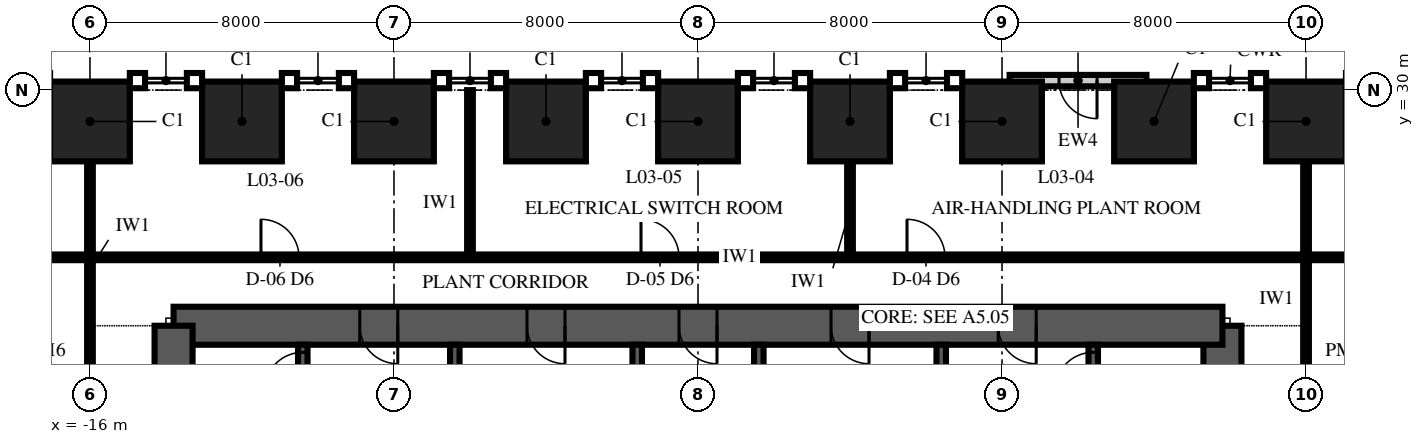
"""IFC4 building model, lengths in metres.
Left out: names, types, materials, properties, quantities, classifications, styles, units other than length and angle.
Written with IfcOpenShell. Run it as: python <this file> out.ifc"""

import sys

from ifc_helpers import new_model, si_unit, direction, frame, frame_2d, origin, origin_2d, place, context, subcontext, project, spatial, polyline, rectangle, outline, extrude, element, fill, save


model = new_model("IFC4")
c1 = context("Model", 3, precision=1e-05, world=origin(), true_north=direction((0.0, 1.0)))
c2 = subcontext(c1, "Body", "Model", "MODEL_VIEW")
j1 = project(units=[si_unit("LENGTHUNIT", "METRE"), si_unit("PLANEANGLEUNIT", "RADIAN")], contexts=[c1])
p1 = place(None, origin())
s1 = spatial("IfcSite", under=j1, at=p1, CompositionType="ELEMENT")
p2 = place(p1, origin())
s2 = spatial("IfcBuilding", under=s1, at=p2, CompositionType="ELEMENT")
p3 = place(p2, frame((0.0, 0.0, 19.0)))
s3 = spatial("IfcBuildingStorey", under=s2, at=p3, CompositionType="ELEMENT", Elevation=19.0)
for number, where, z_axis, x_axis in (
    (1, (16.0, 29.175, 0.0), (0.0, 0.0, 1.0), (-1.0, 0.0, 0.0)),
    (2, (12.0, 29.175, 0.0), (0.0, 0.0, 1.0), (-1.0, 0.0, 0.0)),
    (3, (8.0, 29.175, 0.0), (0.0, 0.0, 1.0), (-1.0, 0.0, 0.0)),
    (4, (4.0, 29.175, 0.0), (0.0, 0.0, 1.0), (-1.0, 0.0, 0.0)),
    (5, (0.0, 29.175, 0.0), (0.0, 0.0, 1.0), (-1.0, 0.0, 0.0)),
    (6, (-4.0, 29.175, 0.0), (0.0, 0.0, 1.0), (-1.0, 0.0, 0.0)),
    (7, (-8.0, 29.175, 0.0), (0.0, 0.0, 1.0), (-1.0, 0.0, 0.0)),
    (8, (-12.0, 29.175, 0.0), (0.0, 0.0, 1.0), (-1.0, 0.0, 0.0)),
    (9, (-16.0, 29.175, 0.0), (0.0, 0.0, 1.0), (-1.0, 0.0, 0.0)),
):
    element("IfcColumn", number, at=place(p3, frame(where, z_axis=z_axis, x_axis=x_axis)), inside=s3, PredefinedType="COLUMN", context=c2, shape_type="SweptSolid", body=[
        extrude(rectangle(XDim=2.1, YDim=2.1, at=origin_2d()), origin(), (0.0, 0.0, 1.0), 9.0),
    ])
p4 = place(p3, frame((13.8, 6.2, 0.0), z_axis=(0.0, 0.0, 1.0), x_axis=(0.0, 1.0, 0.0)))
e10 = element("IfcWall", 10, at=p4, inside=s3, PredefinedType="SHEAR", context=c2, shape_type="SweptSolid", body=[
    extrude(outline(polyline([(0.0, -0.5), (17.6, -0.5), (17.6, 0.0), (17.1, 0.0), (17.1, 0.5), (0.5, 0.5), (0.5, 0.0), (0.0, 0.0), (0.0, -0.5)])), origin(), (0.0, 0.0, 1.0), 9.0),
])
p5 = place(p4, frame((4.1, 0.0, 0.0)))
e11 = element("IfcOpeningElement", 11, at=p5, cuts=e10, PredefinedType="OPENING", context=c2, shape_type="SweptSolid", body=[
    extrude(rectangle(XDim=1.8, YDim=2.4, at=frame_2d((0.9, 1.2))), frame((0.0, 0.515, 0.0), z_axis=(0.0, -1.0, 0.0), x_axis=(1.0, 0.0, 0.0)), (0.0, 0.0, 1.0), 1.03),
])
p6 = place(p3, frame((13.8, 23.8, 0.0), z_axis=(0.0, 0.0, 1.0), x_axis=(-1.0, 0.0, 0.0)))
e12 = element("IfcWall", 12, at=p6, inside=s3, PredefinedType="SHEAR", context=c2, shape_type="SweptSolid", body=[
    extrude(rectangle(XDim=27.6, YDim=1.0, at=frame_2d((13.8, 0.0))), origin(), (0.0, 0.0, 1.0), 9.0),
])
p7 = place(p6, frame((21.7, 0.0, 0.0)))
e13 = element("IfcOpeningElement", 13, at=p7, cuts=e12, PredefinedType="OPENING", context=c2, shape_type="SweptSolid", body=[
    extrude(rectangle(XDim=1.0, YDim=2.1, at=frame_2d((0.5, 1.05))), frame((0.0, 0.515, 0.0), z_axis=(0.0, -1.0, 0.0), x_axis=(1.0, 0.0, 0.0)), (0.0, 0.0, 1.0), 1.03),
])
p8 = place(p6, frame((4.9, 0.0, 0.0)))
e14 = element("IfcOpeningElement", 14, at=p8, cuts=e12, PredefinedType="OPENING", context=c2, shape_type="SweptSolid", body=[
    extrude(rectangle(XDim=1.0, YDim=2.1, at=frame_2d((0.5, 1.05))), frame((0.0, 0.515, 0.0), z_axis=(0.0, -1.0, 0.0), x_axis=(1.0, 0.0, 0.0)), (0.0, 0.0, 1.0), 1.03),
])
p9 = place(p6, frame((17.3, 0.0, 0.0)))
e15 = element("IfcOpeningElement", 15, at=p9, cuts=e12, PredefinedType="OPENING", context=c2, shape_type="SweptSolid", body=[
    extrude(rectangle(XDim=1.0, YDim=2.1, at=frame_2d((0.5, 1.05))), frame((0.0, 0.515, 0.0), z_axis=(0.0, -1.0, 0.0), x_axis=(1.0, 0.0, 0.0)), (0.0, 0.0, 1.0), 1.03),
])
p10 = place(p6, frame((13.3, 0.0, 0.0)))
e16 = element("IfcOpeningElement", 16, at=p10, cuts=e12, PredefinedType="OPENING", context=c2, shape_type="SweptSolid", body=[
    extrude(rectangle(XDim=1.0, YDim=2.1, at=frame_2d((0.5, 1.05))), frame((0.0, 0.515, 0.0), z_axis=(0.0, -1.0, 0.0), x_axis=(1.0, 0.0, 0.0)), (0.0, 0.0, 1.0), 1.03),
])
p11 = place(p6, frame((9.3, 0.0, 0.0)))
e17 = element("IfcOpeningElement", 17, at=p11, cuts=e12, PredefinedType="OPENING", context=c2, shape_type="SweptSolid", body=[
    extrude(rectangle(XDim=1.0, YDim=2.1, at=frame_2d((0.5, 1.05))), frame((0.0, 0.515, 0.0), z_axis=(0.0, -1.0, 0.0), x_axis=(1.0, 0.0, 0.0)), (0.0, 0.0, 1.0), 1.03),
])
p12 = place(p3, frame((-13.8, 23.8, 0.0), z_axis=(0.0, 0.0, 1.0), x_axis=(0.0, -1.0, 0.0)))
e18 = element("IfcWall", 18, at=p12, inside=s3, PredefinedType="SHEAR", context=c2, shape_type="SweptSolid", body=[
    extrude(outline(polyline([(0.0, -0.5), (17.6, -0.5), (17.6, 0.0), (17.1, 0.0), (17.1, 0.5), (0.5, 0.5), (0.5, 0.0), (0.0, 0.0), (0.0, -0.5)])), origin(), (0.0, 0.0, 1.0), 9.0),
])
p13 = place(p12, frame((11.7, 0.0, 0.0)))
e19 = element("IfcOpeningElement", 19, at=p13, cuts=e18, PredefinedType="OPENING", context=c2, shape_type="SweptSolid", body=[
    extrude(rectangle(XDim=1.8, YDim=2.4, at=frame_2d((0.9, 1.2))), frame((0.0, 0.515, 0.0), z_axis=(0.0, -1.0, 0.0), x_axis=(1.0, 0.0, 0.0)), (0.0, 0.0, 1.0), 1.03),
])
p14 = place(p3, frame((-10.4, 16.125, 0.0), z_axis=(0.0, 0.0, 1.0), x_axis=(0.0, 1.0, 0.0)))
e20 = element("IfcWall", 20, at=p14, inside=s3, PredefinedType="SHEAR", context=c2, shape_type="SweptSolid", body=[
    extrude(rectangle(XDim=7.175, YDim=0.25, at=frame_2d((3.587, 0.0))), origin(), (0.0, 0.0, 1.0), 9.0),
])
p15 = place(p14, frame((5.975, 0.0, 0.0)))
e21 = element("IfcOpeningElement", 21, at=p15, cuts=e20, PredefinedType="OPENING", context=c2, shape_type="SweptSolid", body=[
    extrude(rectangle(XDim=1.0, YDim=2.1, at=frame_2d((0.5, 1.05))), frame((0.0, 0.14, 0.0), z_axis=(0.0, -1.0, 0.0), x_axis=(1.0, 0.0, 0.0)), (0.0, 0.0, 1.0), 0.28),
])
for number, where, z_axis, x_axis in (
    (22, (-6.4, 16.125, 0.0), (0.0, 0.0, 1.0), (0.0, 1.0, 0.0)),
    (23, (-1.6, 16.125, 0.0), (0.0, 0.0, 1.0), (0.0, 1.0, 0.0)),
    (24, (1.6, 16.125, 0.0), (0.0, 0.0, 1.0), (0.0, 1.0, 0.0)),
    (25, (6.4, 16.125, 0.0), (0.0, 0.0, 1.0), (0.0, 1.0, 0.0)),
):
    element("IfcWall", number, at=place(p3, frame(where, z_axis=z_axis, x_axis=x_axis)), inside=s3, PredefinedType="SHEAR", context=c2, shape_type="SweptSolid", body=[
        extrude(rectangle(XDim=7.175, YDim=0.25, at=frame_2d((3.587, 0.0))), origin(), (0.0, 0.0, 1.0), 9.0),
    ])
p16 = place(p3, frame((10.4, 16.125, 0.0), z_axis=(0.0, 0.0, 1.0), x_axis=(0.0, 1.0, 0.0)))
e26 = element("IfcWall", 26, at=p16, inside=s3, PredefinedType="SHEAR", context=c2, shape_type="SweptSolid", body=[
    extrude(rectangle(XDim=7.175, YDim=0.25, at=frame_2d((3.587, 0.0))), origin(), (0.0, 0.0, 1.0), 9.0),
])
p17 = place(p16, frame((5.975, 0.0, 0.0)))
e27 = element("IfcOpeningElement", 27, at=p17, cuts=e26, PredefinedType="OPENING", context=c2, shape_type="SweptSolid", body=[
    extrude(rectangle(XDim=1.0, YDim=2.1, at=frame_2d((0.5, 1.05))), frame((0.0, 0.14, 0.0), z_axis=(0.0, -1.0, 0.0), x_axis=(1.0, 0.0, 0.0)), (0.0, 0.0, 1.0), 0.28),
])
p18 = place(p3, frame((11.8, 30.25, 0.0), z_axis=(0.0, 0.0, 1.0), x_axis=(-1.0, 0.0, 0.0)))
e28 = element("IfcWall", 28, at=p18, inside=s3, PredefinedType="SOLIDWALL", context=c2, shape_type="SweptSolid", body=[
    extrude(rectangle(XDim=3.6, YDim=0.3, at=frame_2d((1.8, 0.0))), origin(), (0.0, 0.0, 1.0), 9.0),
])
p19 = place(p18, frame((1.3, 0.0, 0.0)))
e29 = element("IfcOpeningElement", 29, at=p19, cuts=e28, PredefinedType="OPENING", context=c2, shape_type="SweptSolid", body=[
    extrude(rectangle(XDim=1.0, YDim=2.2, at=frame_2d((0.5, 1.1))), frame((0.0, 0.165, 0.0), z_axis=(0.0, -1.0, 0.0), x_axis=(1.0, 0.0, 0.0)), (0.0, 0.0, 1.0), 0.33),
])
p20 = place(p3, frame((-16.0, 22.46, 0.0), z_axis=(0.0, 0.0, 1.0), x_axis=(0.0, 1.0, 0.0)))
e30 = element("IfcWall", 30, at=p20, inside=s3, PredefinedType="PARTITIONING", context=c2, shape_type="SweptSolid", body=[
    extrude(rectangle(XDim=5.655, YDim=0.15, at=frame_2d((2.828, 0.0))), origin(), (0.0, 0.0, 1.0), 8.317),
])
p21 = place(p3, frame((-6.0, 25.6, 0.0), z_axis=(0.0, 0.0, 1.0), x_axis=(0.0, 1.0, 0.0)))
e31 = element("IfcWall", 31, at=p21, inside=s3, PredefinedType="PARTITIONING", context=c2, shape_type="SweptSolid", body=[
    extrude(rectangle(XDim=4.4, YDim=0.15, at=frame_2d((2.2, 0.0))), origin(), (0.0, 0.0, 1.0), 8.75),
])
p22 = place(p3, frame((4.0, 25.6, 0.0), z_axis=(0.0, 0.0, 1.0), x_axis=(0.0, 1.0, 0.0)))
e32 = element("IfcWall", 32, at=p22, inside=s3, PredefinedType="PARTITIONING", context=c2, shape_type="SweptSolid", body=[
    extrude(rectangle(XDim=2.515, YDim=0.15, at=frame_2d((1.257, 0.0))), origin(), (0.0, 0.0, 1.0), 8.75),
])
p23 = place(p3, frame((16.0, 22.46, 0.0), z_axis=(0.0, 0.0, 1.0), x_axis=(0.0, 1.0, 0.0)))
e33 = element("IfcWall", 33, at=p23, inside=s3, PredefinedType="PARTITIONING", context=c2, shape_type="SweptSolid", body=[
    extrude(rectangle(XDim=5.655, YDim=0.15, at=frame_2d((2.828, 0.0))), origin(), (0.0, 0.0, 1.0), 8.317),
])
p24 = place(p3, frame((-22.493, 25.6, 0.0), z_axis=(0.0, 0.0, 1.0), x_axis=(1.0, 0.0, 0.0)))
e34 = element("IfcWall", 34, at=p24, inside=s3, PredefinedType="PARTITIONING", context=c2, shape_type="SweptSolid", body=[
    extrude(rectangle(XDim=44.986, YDim=0.15, at=frame_2d((22.493, 0.0))), origin(), (0.0, 0.0, 1.0), 8.75),
])
p25 = place(p24, frame((10.993, 0.0, 0.0)))
e35 = element("IfcOpeningElement", 35, at=p25, cuts=e34, PredefinedType="OPENING", context=c2, shape_type="SweptSolid", body=[
    extrude(rectangle(XDim=1.0, YDim=2.1, at=frame_2d((0.5, 1.05))), frame((0.0, 0.09, 0.0), z_axis=(0.0, -1.0, 0.0), x_axis=(1.0, 0.0, 0.0)), (0.0, 0.0, 1.0), 0.18),
])
p26 = place(p24, frame((20.993, 0.0, 0.0)))
e36 = element("IfcOpeningElement", 36, at=p26, cuts=e34, PredefinedType="OPENING", context=c2, shape_type="SweptSolid", body=[
    extrude(rectangle(XDim=1.0, YDim=2.1, at=frame_2d((0.5, 1.05))), frame((0.0, 0.09, 0.0), z_axis=(0.0, -1.0, 0.0), x_axis=(1.0, 0.0, 0.0)), (0.0, 0.0, 1.0), 0.18),
])
p27 = place(p24, frame((27.993, 0.0, 0.0)))
e37 = element("IfcOpeningElement", 37, at=p27, cuts=e34, PredefinedType="OPENING", context=c2, shape_type="SweptSolid", body=[
    extrude(rectangle(XDim=1.0, YDim=2.1, at=frame_2d((0.5, 1.05))), frame((0.0, 0.09, 0.0), z_axis=(0.0, -1.0, 0.0), x_axis=(1.0, 0.0, 0.0)), (0.0, 0.0, 1.0), 0.18),
])
p28 = place(p19, origin())
e38 = element("IfcDoor", 38, at=p28, inside=s3, OperationType="SINGLE_SWING_RIGHT", PredefinedType="DOOR", context=c2, shape_type="SweptSolid", body=[
    extrude(rectangle(XDim=1.0, YDim=2.2, at=frame_2d((0.5, 1.1))), frame((0.0, 0.15, 0.0), z_axis=(0.0, -1.0, 0.0), x_axis=(1.0, 0.0, 0.0)), (0.0, 0.0, 1.0), 0.3),
])
fill(e29, e38)
p29 = place(p7, origin())
e39 = element("IfcDoor", 39, at=p29, inside=s3, OperationType="SINGLE_SWING_RIGHT", PredefinedType="DOOR", context=c2, shape_type="SweptSolid", body=[
    extrude(rectangle(XDim=1.0, YDim=2.1, at=frame_2d((0.5, 1.05))), frame((0.0, 0.5, 0.0), z_axis=(0.0, -1.0, 0.0), x_axis=(1.0, 0.0, 0.0)), (0.0, 0.0, 1.0), 1.0),
])
fill(e13, e39)
p30 = place(p8, origin())
e40 = element("IfcDoor", 40, at=p30, inside=s3, OperationType="SINGLE_SWING_RIGHT", PredefinedType="DOOR", context=c2, shape_type="SweptSolid", body=[
    extrude(rectangle(XDim=1.0, YDim=2.1, at=frame_2d((0.5, 1.05))), frame((0.0, 0.5, 0.0), z_axis=(0.0, -1.0, 0.0), x_axis=(1.0, 0.0, 0.0)), (0.0, 0.0, 1.0), 1.0),
])
fill(e14, e40)
p31 = place(p9, origin())
e41 = element("IfcDoor", 41, at=p31, inside=s3, OperationType="SINGLE_SWING_LEFT", PredefinedType="DOOR", context=c2, shape_type="SweptSolid", body=[
    extrude(rectangle(XDim=1.0, YDim=2.1, at=frame_2d((0.5, 1.05))), frame((0.0, 0.5, 0.0), z_axis=(0.0, -1.0, 0.0), x_axis=(1.0, 0.0, 0.0)), (0.0, 0.0, 1.0), 1.0),
])
fill(e15, e41)
p32 = place(p10, origin())
e42 = element("IfcDoor", 42, at=p32, inside=s3, OperationType="SINGLE_SWING_LEFT", PredefinedType="DOOR", context=c2, shape_type="SweptSolid", body=[
    extrude(rectangle(XDim=1.0, YDim=2.1, at=frame_2d((0.5, 1.05))), frame((0.0, 0.5, 0.0), z_axis=(0.0, -1.0, 0.0), x_axis=(1.0, 0.0, 0.0)), (0.0, 0.0, 1.0), 1.0),
])
fill(e16, e42)
p33 = place(p11, origin())
e43 = element("IfcDoor", 43, at=p33, inside=s3, OperationType="SINGLE_SWING_LEFT", PredefinedType="DOOR", context=c2, shape_type="SweptSolid", body=[
    extrude(rectangle(XDim=1.0, YDim=2.1, at=frame_2d((0.5, 1.05))), frame((0.0, 0.5, 0.0), z_axis=(0.0, -1.0, 0.0), x_axis=(1.0, 0.0, 0.0)), (0.0, 0.0, 1.0), 1.0),
])
fill(e17, e43)
p34 = place(p15, origin())
e44 = element("IfcDoor", 44, at=p34, inside=s3, OperationType="SINGLE_SWING_LEFT", PredefinedType="DOOR", context=c2, shape_type="SweptSolid", body=[
    extrude(rectangle(XDim=1.0, YDim=2.1, at=frame_2d((0.5, 1.05))), frame((0.0, 0.125, 0.0), z_axis=(0.0, -1.0, 0.0), x_axis=(1.0, 0.0, 0.0)), (0.0, 0.0, 1.0), 0.25),
])
fill(e21, e44)
p35 = place(p17, origin())
e45 = element("IfcDoor", 45, at=p35, inside=s3, OperationType="SINGLE_SWING_LEFT", PredefinedType="DOOR", context=c2, shape_type="SweptSolid", body=[
    extrude(rectangle(XDim=1.0, YDim=2.1, at=frame_2d((0.5, 1.05))), frame((0.0, 0.125, 0.0), z_axis=(0.0, -1.0, 0.0), x_axis=(1.0, 0.0, 0.0)), (0.0, 0.0, 1.0), 0.25),
])
fill(e27, e45)
p36 = place(p25, origin())
e46 = element("IfcDoor", 46, at=p36, inside=s3, OperationType="SINGLE_SWING_LEFT", PredefinedType="DOOR", context=c2, shape_type="SweptSolid", body=[
    extrude(rectangle(XDim=1.0, YDim=2.1, at=frame_2d((0.5, 1.05))), frame((0.0, 0.075, 0.0), z_axis=(0.0, -1.0, 0.0), x_axis=(1.0, 0.0, 0.0)), (0.0, 0.0, 1.0), 0.149),
])
fill(e35, e46)
p37 = place(p26, origin())
e47 = element("IfcDoor", 47, at=p37, inside=s3, OperationType="SINGLE_SWING_LEFT", PredefinedType="DOOR", context=c2, shape_type="SweptSolid", body=[
    extrude(rectangle(XDim=1.0, YDim=2.1, at=frame_2d((0.5, 1.05))), frame((0.0, 0.075, 0.0), z_axis=(0.0, -1.0, 0.0), x_axis=(1.0, 0.0, 0.0)), (0.0, 0.0, 1.0), 0.149),
])
fill(e36, e47)
p38 = place(p27, origin())
e48 = element("IfcDoor", 48, at=p38, inside=s3, OperationType="SINGLE_SWING_LEFT", PredefinedType="DOOR", context=c2, shape_type="SweptSolid", body=[
    extrude(rectangle(XDim=1.0, YDim=2.1, at=frame_2d((0.5, 1.05))), frame((0.0, 0.075, 0.0), z_axis=(0.0, -1.0, 0.0), x_axis=(1.0, 0.0, 0.0)), (0.0, 0.0, 1.0), 0.149),
])
fill(e37, e48)
save(model, sys.argv[1])
